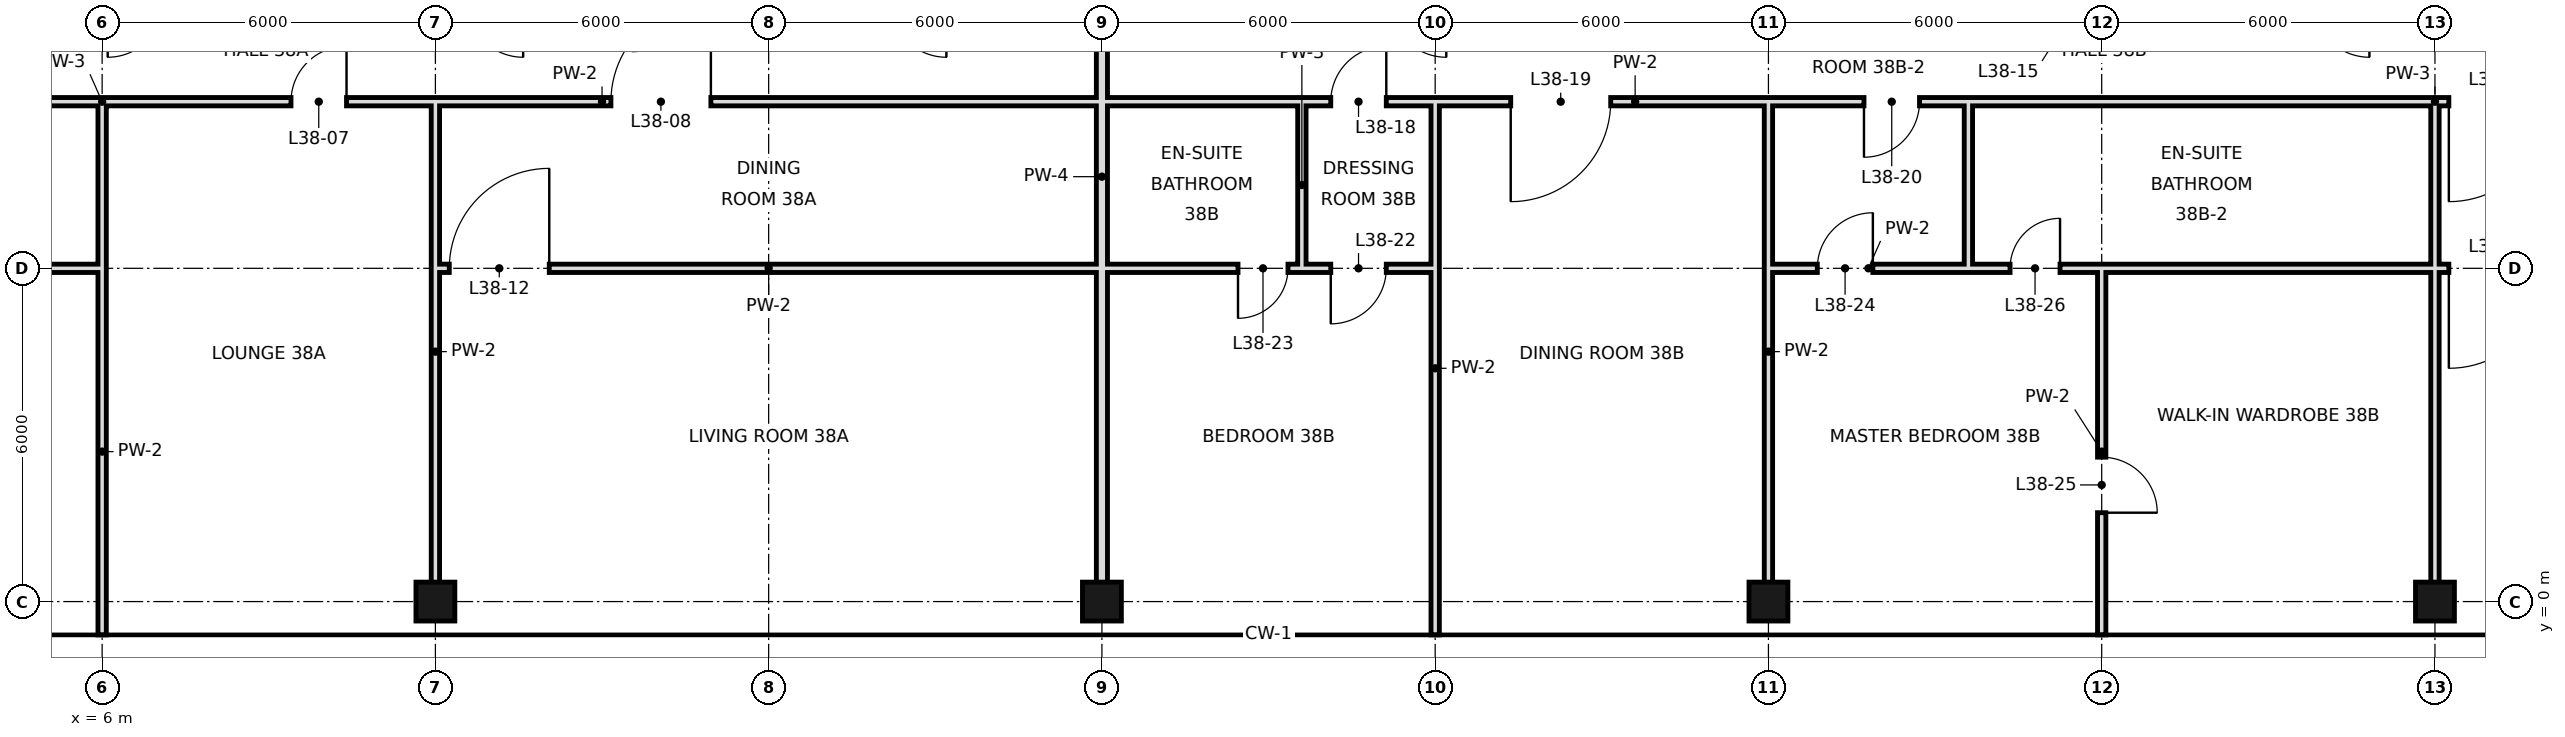
"""IFC4 building model, lengths in metres.
Left out: names, types, materials, properties, quantities, classifications, styles, units other than length and angle.
Written with IfcOpenShell. Run it as: python <this file> out.ifc"""

import sys

from ifc_helpers import new_model, si_unit, direction, frame, frame_2d, origin, origin_2d, place, context, subcontext, project, spatial, rectangle, hollow_rectangle, extrude, element, fill, save


model = new_model("IFC4")
c1 = context("Model", 3, precision=1e-05, world=origin(), true_north=direction((0.0, 1.0)))
c2 = subcontext(c1, "Body", "Model", "MODEL_VIEW")
j1 = project(units=[si_unit("LENGTHUNIT", "METRE"), si_unit("PLANEANGLEUNIT", "RADIAN")], contexts=[c1])
p1 = place(None, origin())
s1 = spatial("IfcSite", under=j1, at=p1, CompositionType="ELEMENT")
p2 = place(p1, origin())
s2 = spatial("IfcBuilding", under=s1, at=p2, CompositionType="ELEMENT")
p3 = place(p2, frame((0.0, 0.0, 167.2)))
s3 = spatial("IfcBuildingStorey", under=s2, at=p3, CompositionType="ELEMENT", Elevation=167.2)
for number, where, z_axis, x_axis in (
    (1, (12.0, 0.0, 0.0), (0.0, 0.0, 1.0), (1.0, 0.0, 0.0)),
    (2, (24.0, 0.0, 0.0), (0.0, 0.0, 1.0), (1.0, 0.0, 0.0)),
    (3, (36.0, 0.0, 0.0), (0.0, 0.0, 1.0), (1.0, 0.0, 0.0)),
    (4, (48.0, 0.0, 0.0), (0.0, 0.0, 1.0), (1.0, 0.0, 0.0)),
):
    element("IfcColumn", number, at=place(p3, frame(where, z_axis=z_axis, x_axis=x_axis)), inside=s3, PredefinedType="COLUMN", context=c2, shape_type="SweptSolid", body=[
        extrude(hollow_rectangle(XDim=0.7, YDim=0.7, WallThickness=0.036, at=origin_2d()), origin(), (0.0, 0.0, 1.0), 3.6),
    ])
p4 = place(p3, frame((12.0, 0.0, 0.0), z_axis=(0.0, 0.0, 1.0), x_axis=(0.0, 1.0, 0.0)))
e5 = element("IfcWall", 5, at=p4, inside=s3, PredefinedType="PARTITIONING", context=c2, shape_type="SweptSolid", body=[
    extrude(rectangle(XDim=9.0, YDim=0.15, at=frame_2d((4.5, 0.0))), origin(), (0.0, 0.0, 1.0), 2.72),
])
p5 = place(p3, frame((24.0, 0.0, 0.0), z_axis=(0.0, 0.0, 1.0), x_axis=(0.0, 1.0, 0.0)))
e6 = element("IfcWall", 6, at=p5, inside=s3, PredefinedType="SOLIDWALL", context=c2, shape_type="SweptSolid", body=[
    extrude(rectangle(XDim=15.3, YDim=0.2, at=frame_2d((7.65, 0.0))), origin(), (0.0, 0.0, 1.0), 2.72),
])
p6 = place(p3, frame((27.6, 6.0, 0.0), z_axis=(0.0, 0.0, 1.0), x_axis=(0.0, 1.0, 0.0)))
e7 = element("IfcWall", 7, at=p6, inside=s3, PredefinedType="PARTITIONING", context=c2, shape_type="SweptSolid", body=[
    extrude(rectangle(XDim=3.0, YDim=0.15, at=frame_2d((1.5, 0.0))), origin(), (0.0, 0.0, 1.0), 3.42),
])
p7 = place(p3, frame((30.0, -0.6, 0.0), z_axis=(0.0, 0.0, 1.0), x_axis=(0.0, 1.0, 0.0)))
e8 = element("IfcWall", 8, at=p7, inside=s3, PredefinedType="PARTITIONING", context=c2, shape_type="SweptSolid", body=[
    extrude(rectangle(XDim=9.6, YDim=0.15, at=frame_2d((4.8, 0.0))), origin(), (0.0, 0.0, 1.0), 2.72),
])
p8 = place(p3, frame((36.0, 0.0, 0.0), z_axis=(0.0, 0.0, 1.0), x_axis=(0.0, 1.0, 0.0)))
e9 = element("IfcWall", 9, at=p8, inside=s3, PredefinedType="PARTITIONING", context=c2, shape_type="SweptSolid", body=[
    extrude(rectangle(XDim=9.0, YDim=0.15, at=frame_2d((4.5, 0.0))), origin(), (0.0, 0.0, 1.0), 2.72),
])
p9 = place(p3, frame((39.6, 6.0, 0.0), z_axis=(0.0, 0.0, 1.0), x_axis=(0.0, 1.0, 0.0)))
e10 = element("IfcWall", 10, at=p9, inside=s3, PredefinedType="PARTITIONING", context=c2, shape_type="SweptSolid", body=[
    extrude(rectangle(XDim=3.0, YDim=0.15, at=frame_2d((1.5, 0.0))), origin(), (0.0, 0.0, 1.0), 3.42),
])
p10 = place(p3, frame((42.0, -0.6, 0.0), z_axis=(0.0, 0.0, 1.0), x_axis=(0.0, 1.0, 0.0)))
e11 = element("IfcWall", 11, at=p10, inside=s3, PredefinedType="PARTITIONING", context=c2, shape_type="SweptSolid", body=[
    extrude(rectangle(XDim=6.6, YDim=0.15, at=frame_2d((3.3, 0.0))), origin(), (0.0, 0.0, 1.0), 2.72),
])
p11 = place(p10, frame((2.2, 0.0, 0.0)))
e12 = element("IfcOpeningElement", 12, at=p11, cuts=e11, PredefinedType="OPENING", context=c2, shape_type="SweptSolid", body=[
    extrude(rectangle(XDim=1.0, YDim=2.4, at=frame_2d((0.5, 1.2))), frame((0.0, 0.085, 0.0), z_axis=(0.0, -1.0, 0.0), x_axis=(1.0, 0.0, 0.0)), (0.0, 0.0, 1.0), 0.17),
])
p12 = place(p3, frame((48.0, 0.0, 0.0), z_axis=(0.0, 0.0, 1.0), x_axis=(0.0, 1.0, 0.0)))
e13 = element("IfcWall", 13, at=p12, inside=s3, PredefinedType="PARTITIONING", context=c2, shape_type="SweptSolid", body=[
    extrude(rectangle(XDim=6.0, YDim=0.15, at=frame_2d((3.0, 0.0))), origin(), (0.0, 0.0, 1.0), 2.72),
])
p13 = place(p3, frame((48.0, 6.0, 0.0), z_axis=(0.0, 0.0, 1.0), x_axis=(0.0, 1.0, 0.0)))
e14 = element("IfcWall", 14, at=p13, inside=s3, PredefinedType="PARTITIONING", context=c2, shape_type="SweptSolid", body=[
    extrude(rectangle(XDim=3.0, YDim=0.15, at=frame_2d((1.5, 0.0))), origin(), (0.0, 0.0, 1.0), 2.72),
])
p14 = place(p3, frame((6.0, -0.6, 0.0), z_axis=(0.0, 0.0, 1.0), x_axis=(0.0, 1.0, 0.0)))
e15 = element("IfcWall", 15, at=p14, inside=s3, PredefinedType="PARTITIONING", context=c2, shape_type="SweptSolid", body=[
    extrude(rectangle(XDim=6.6, YDim=0.15, at=frame_2d((3.3, 0.0))), origin(), (0.0, 0.0, 1.0), 2.72),
])
p15 = place(p3, frame((6.0, 6.0, 0.0), z_axis=(0.0, 0.0, 1.0), x_axis=(0.0, 1.0, 0.0)))
e16 = element("IfcWall", 16, at=p15, inside=s3, PredefinedType="PARTITIONING", context=c2, shape_type="SweptSolid", body=[
    extrude(rectangle(XDim=3.0, YDim=0.15, at=frame_2d((1.5, 0.0))), origin(), (0.0, 0.0, 1.0), 2.72),
])
p16 = place(p3, frame((12.0, 6.0, 0.0), z_axis=(0.0, 0.0, 1.0), x_axis=(1.0, 0.0, 0.0)))
e17 = element("IfcWall", 17, at=p16, inside=s3, PredefinedType="PARTITIONING", context=c2, shape_type="SweptSolid", body=[
    extrude(rectangle(XDim=12.0, YDim=0.15, at=frame_2d((6.0, 0.0))), origin(), (0.0, 0.0, 1.0), 2.97),
])
p17 = place(p16, frame((0.25, 0.0, 0.0)))
e18 = element("IfcOpeningElement", 18, at=p17, cuts=e17, PredefinedType="OPENING", context=c2, shape_type="SweptSolid", body=[
    extrude(rectangle(XDim=1.8, YDim=2.4, at=frame_2d((0.9, 1.2))), frame((0.0, 0.085, 0.0), z_axis=(0.0, -1.0, 0.0), x_axis=(1.0, 0.0, 0.0)), (0.0, 0.0, 1.0), 0.17),
])
p18 = place(p3, frame((27.6, 6.0, 0.0), z_axis=(0.0, 0.0, 1.0), x_axis=(1.0, 0.0, 0.0)))
e19 = element("IfcWall", 19, at=p18, inside=s3, PredefinedType="PARTITIONING", context=c2, shape_type="SweptSolid", body=[
    extrude(rectangle(XDim=2.4, YDim=0.15, at=frame_2d((1.2, 0.0))), origin(), (0.0, 0.0, 1.0), 2.97),
])
p19 = place(p18, frame((0.52, 0.0, 0.0)))
e20 = element("IfcOpeningElement", 20, at=p19, cuts=e19, PredefinedType="OPENING", context=c2, shape_type="SweptSolid", body=[
    extrude(rectangle(XDim=1.0, YDim=2.4, at=frame_2d((0.5, 1.2))), frame((0.0, 0.085, 0.0), z_axis=(0.0, -1.0, 0.0), x_axis=(1.0, 0.0, 0.0)), (0.0, 0.0, 1.0), 0.17),
])
p20 = place(p3, frame((36.0, 6.0, 0.0), z_axis=(0.0, 0.0, 1.0), x_axis=(1.0, 0.0, 0.0)))
e21 = element("IfcWall", 21, at=p20, inside=s3, PredefinedType="PARTITIONING", context=c2, shape_type="SweptSolid", body=[
    extrude(rectangle(XDim=3.6, YDim=0.15, at=frame_2d((1.8, 0.0))), origin(), (0.0, 0.0, 1.0), 2.97),
])
p21 = place(p20, frame((0.88, 0.0, 0.0)))
e22 = element("IfcOpeningElement", 22, at=p21, cuts=e21, PredefinedType="OPENING", context=c2, shape_type="SweptSolid", body=[
    extrude(rectangle(XDim=1.0, YDim=2.4, at=frame_2d((0.5, 1.2))), frame((0.0, 0.085, 0.0), z_axis=(0.0, -1.0, 0.0), x_axis=(1.0, 0.0, 0.0)), (0.0, 0.0, 1.0), 0.17),
])
p22 = place(p3, frame((48.0, 6.0, 0.0), z_axis=(0.0, 0.0, 1.0), x_axis=(1.0, 0.0, 0.0)))
e23 = element("IfcWall", 23, at=p22, inside=s3, PredefinedType="PARTITIONING", context=c2, shape_type="SweptSolid", body=[
    extrude(rectangle(XDim=12.0, YDim=0.15, at=frame_2d((6.0, 0.0))), origin(), (0.0, 0.0, 1.0), 2.72),
])
p23 = place(p22, frame((0.25, 0.0, 0.0)))
e24 = element("IfcOpeningElement", 24, at=p23, cuts=e23, PredefinedType="OPENING", context=c2, shape_type="SweptSolid", body=[
    extrude(rectangle(XDim=1.8, YDim=2.4, at=frame_2d((0.9, 1.2))), frame((0.0, 0.085, 0.0), z_axis=(0.0, -1.0, 0.0), x_axis=(1.0, 0.0, 0.0)), (0.0, 0.0, 1.0), 0.17),
])
p24 = place(p3, frame((-2.4, 6.0, 0.0), z_axis=(0.0, 0.0, 1.0), x_axis=(1.0, 0.0, 0.0)))
e25 = element("IfcWall", 25, at=p24, inside=s3, PredefinedType="PARTITIONING", context=c2, shape_type="SweptSolid", body=[
    extrude(rectangle(XDim=8.4, YDim=0.15, at=frame_2d((4.2, 0.0))), origin(), (0.0, 0.0, 1.0), 2.97),
])
p25 = place(p24, frame((0.75, 0.0, 0.0)))
e26 = element("IfcOpeningElement", 26, at=p25, cuts=e25, PredefinedType="OPENING", context=c2, shape_type="SweptSolid", body=[
    extrude(rectangle(XDim=0.9, YDim=2.4, at=frame_2d((0.45, 1.2))), frame((0.0, 0.085, 0.0), z_axis=(0.0, -1.0, 0.0), x_axis=(1.0, 0.0, 0.0)), (0.0, 0.0, 1.0), 0.17),
])
p26 = place(p3, frame((24.0, 6.0, 0.0), z_axis=(0.0, 0.0, 1.0), x_axis=(1.0, 0.0, 0.0)))
e27 = element("IfcWall", 27, at=p26, inside=s3, PredefinedType="PARTITIONING", context=c2, shape_type="SweptSolid", body=[
    extrude(rectangle(XDim=3.6, YDim=0.15, at=frame_2d((1.8, 0.0))), origin(), (0.0, 0.0, 1.0), 2.97),
])
p27 = place(p26, frame((2.45, 0.0, 0.0)))
e28 = element("IfcOpeningElement", 28, at=p27, cuts=e27, PredefinedType="OPENING", context=c2, shape_type="SweptSolid", body=[
    extrude(rectangle(XDim=0.9, YDim=2.4, at=frame_2d((0.45, 1.2))), frame((0.0, 0.085, 0.0), z_axis=(0.0, -1.0, 0.0), x_axis=(1.0, 0.0, 0.0)), (0.0, 0.0, 1.0), 0.17),
])
p28 = place(p3, frame((39.6, 6.0, 0.0), z_axis=(0.0, 0.0, 1.0), x_axis=(1.0, 0.0, 0.0)))
e29 = element("IfcWall", 29, at=p28, inside=s3, PredefinedType="PARTITIONING", context=c2, shape_type="SweptSolid", body=[
    extrude(rectangle(XDim=8.4, YDim=0.15, at=frame_2d((4.2, 0.0))), origin(), (0.0, 0.0, 1.0), 2.97),
])
p29 = place(p28, frame((0.75, 0.0, 0.0)))
e30 = element("IfcOpeningElement", 30, at=p29, cuts=e29, PredefinedType="OPENING", context=c2, shape_type="SweptSolid", body=[
    extrude(rectangle(XDim=0.9, YDim=2.4, at=frame_2d((0.45, 1.2))), frame((0.0, 0.085, 0.0), z_axis=(0.0, -1.0, 0.0), x_axis=(1.0, 0.0, 0.0)), (0.0, 0.0, 1.0), 0.17),
])
p30 = place(p3, frame((6.0, 9.0, 0.0), z_axis=(0.0, 0.0, 1.0), x_axis=(1.0, 0.0, 0.0)))
e31 = element("IfcWall", 31, at=p30, inside=s3, PredefinedType="PARTITIONING", context=c2, shape_type="SweptSolid", body=[
    extrude(rectangle(XDim=18.0, YDim=0.15, at=frame_2d((9.0, 0.0))), origin(), (0.0, 0.0, 1.0), 3.42),
])
p31 = place(p30, frame((3.4, 0.0, 0.0)))
e32 = element("IfcOpeningElement", 32, at=p31, cuts=e31, PredefinedType="OPENING", context=c2, shape_type="SweptSolid", body=[
    extrude(rectangle(XDim=1.0, YDim=2.4, at=frame_2d((0.5, 1.2))), frame((0.0, 0.085, 0.0), z_axis=(0.0, -1.0, 0.0), x_axis=(1.0, 0.0, 0.0)), (0.0, 0.0, 1.0), 0.17),
])
p32 = place(p30, frame((9.16, 0.0, 0.0)))
e33 = element("IfcOpeningElement", 33, at=p32, cuts=e31, PredefinedType="OPENING", context=c2, shape_type="SweptSolid", body=[
    extrude(rectangle(XDim=1.8, YDim=2.4, at=frame_2d((0.9, 1.2))), frame((0.0, 0.085, 0.0), z_axis=(0.0, -1.0, 0.0), x_axis=(1.0, 0.0, 0.0)), (0.0, 0.0, 1.0), 0.17),
])
p33 = place(p3, frame((27.6, 9.0, 0.0), z_axis=(0.0, 0.0, 1.0), x_axis=(1.0, 0.0, 0.0)))
e34 = element("IfcWall", 34, at=p33, inside=s3, PredefinedType="PARTITIONING", context=c2, shape_type="SweptSolid", body=[
    extrude(rectangle(XDim=12.0, YDim=0.15, at=frame_2d((6.0, 0.0))), origin(), (0.0, 0.0, 1.0), 3.42),
])
p34 = place(p33, frame((0.52, 0.0, 0.0)))
e35 = element("IfcOpeningElement", 35, at=p34, cuts=e34, PredefinedType="OPENING", context=c2, shape_type="SweptSolid", body=[
    extrude(rectangle(XDim=1.0, YDim=2.4, at=frame_2d((0.5, 1.2))), frame((0.0, 0.085, 0.0), z_axis=(0.0, -1.0, 0.0), x_axis=(1.0, 0.0, 0.0)), (0.0, 0.0, 1.0), 0.17),
])
p35 = place(p33, frame((3.76, 0.0, 0.0)))
e36 = element("IfcOpeningElement", 36, at=p35, cuts=e34, PredefinedType="OPENING", context=c2, shape_type="SweptSolid", body=[
    extrude(rectangle(XDim=1.8, YDim=2.4, at=frame_2d((0.9, 1.2))), frame((0.0, 0.085, 0.0), z_axis=(0.0, -1.0, 0.0), x_axis=(1.0, 0.0, 0.0)), (0.0, 0.0, 1.0), 0.17),
])
p36 = place(p33, frame((10.12, 0.0, 0.0)))
e37 = element("IfcOpeningElement", 37, at=p36, cuts=e34, PredefinedType="OPENING", context=c2, shape_type="SweptSolid", body=[
    extrude(rectangle(XDim=1.0, YDim=2.4, at=frame_2d((0.5, 1.2))), frame((0.0, 0.085, 0.0), z_axis=(0.0, -1.0, 0.0), x_axis=(1.0, 0.0, 0.0)), (0.0, 0.0, 1.0), 0.17),
])
p37 = place(p3, frame((48.0, 9.0, 0.0), z_axis=(0.0, 0.0, 1.0), x_axis=(1.0, 0.0, 0.0)))
e38 = element("IfcWall", 38, at=p37, inside=s3, PredefinedType="PARTITIONING", context=c2, shape_type="SweptSolid", body=[
    extrude(rectangle(XDim=12.6, YDim=0.15, at=frame_2d((6.3, 0.0))), origin(), (0.0, 0.0, 1.0), 3.42),
])
p38 = place(p37, frame((0.25, 0.0, 0.0)))
e39 = element("IfcOpeningElement", 39, at=p38, cuts=e38, PredefinedType="OPENING", context=c2, shape_type="SweptSolid", body=[
    extrude(rectangle(XDim=1.8, YDim=2.4, at=frame_2d((0.9, 1.2))), frame((0.0, 0.085, 0.0), z_axis=(0.0, -1.0, 0.0), x_axis=(1.0, 0.0, 0.0)), (0.0, 0.0, 1.0), 0.17),
])
p39 = place(p3, frame((-2.4, 9.0, 0.0), z_axis=(0.0, 0.0, 1.0), x_axis=(1.0, 0.0, 0.0)))
e40 = element("IfcWall", 40, at=p39, inside=s3, PredefinedType="PARTITIONING", context=c2, shape_type="SweptSolid", body=[
    extrude(rectangle(XDim=8.4, YDim=0.15, at=frame_2d((4.2, 0.0))), origin(), (0.0, 0.0, 1.0), 3.42),
])
p40 = place(p3, frame((24.0, 9.0, 0.0), z_axis=(0.0, 0.0, 1.0), x_axis=(1.0, 0.0, 0.0)))
e41 = element("IfcWall", 41, at=p40, inside=s3, PredefinedType="PARTITIONING", context=c2, shape_type="SweptSolid", body=[
    extrude(rectangle(XDim=3.6, YDim=0.15, at=frame_2d((1.8, 0.0))), origin(), (0.0, 0.0, 1.0), 3.42),
])
p41 = place(p3, frame((39.6, 9.0, 0.0), z_axis=(0.0, 0.0, 1.0), x_axis=(1.0, 0.0, 0.0)))
e42 = element("IfcWall", 42, at=p41, inside=s3, PredefinedType="PARTITIONING", context=c2, shape_type="SweptSolid", body=[
    extrude(rectangle(XDim=8.4, YDim=0.15, at=frame_2d((4.2, 0.0))), origin(), (0.0, 0.0, 1.0), 3.42),
])
p42 = place(p31, frame((1.0, 0.0, 0.0), z_axis=(0.0, 0.0, 1.0), x_axis=(-1.0, 0.0, 0.0)))
e43 = element("IfcDoor", 43, at=p42, inside=s3, OperationType="SINGLE_SWING_LEFT", PredefinedType="DOOR", context=c2, shape_type="SweptSolid", body=[
    extrude(rectangle(XDim=1.0, YDim=2.4, at=frame_2d((0.5, 1.2))), frame((0.0, 0.025, 0.0), z_axis=(0.0, -1.0, 0.0), x_axis=(1.0, 0.0, 0.0)), (0.0, 0.0, 1.0), 0.05),
])
fill(e32, e43)
p43 = place(p32, frame((1.8, 0.0, 0.0), z_axis=(0.0, 0.0, 1.0), x_axis=(-1.0, 0.0, 0.0)))
e44 = element("IfcDoor", 44, at=p43, inside=s3, OperationType="SINGLE_SWING_LEFT", PredefinedType="DOOR", context=c2, shape_type="SweptSolid", body=[
    extrude(rectangle(XDim=1.8, YDim=2.4, at=frame_2d((0.9, 1.2))), frame((0.0, 0.025, 0.0), z_axis=(0.0, -1.0, 0.0), x_axis=(1.0, 0.0, 0.0)), (0.0, 0.0, 1.0), 0.05),
])
fill(e33, e44)
p44 = place(p17, frame((1.8, 0.0, 0.0), z_axis=(0.0, 0.0, 1.0), x_axis=(-1.0, 0.0, 0.0)))
e45 = element("IfcDoor", 45, at=p44, inside=s3, OperationType="SINGLE_SWING_LEFT", PredefinedType="DOOR", context=c2, shape_type="SweptSolid", body=[
    extrude(rectangle(XDim=1.8, YDim=2.4, at=frame_2d((0.9, 1.2))), frame((0.0, 0.025, 0.0), z_axis=(0.0, -1.0, 0.0), x_axis=(1.0, 0.0, 0.0)), (0.0, 0.0, 1.0), 0.05),
])
fill(e18, e45)
p45 = place(p34, frame((1.0, 0.0, 0.0), z_axis=(0.0, 0.0, 1.0), x_axis=(-1.0, 0.0, 0.0)))
e46 = element("IfcDoor", 46, at=p45, inside=s3, OperationType="SINGLE_SWING_LEFT", PredefinedType="DOOR", context=c2, shape_type="SweptSolid", body=[
    extrude(rectangle(XDim=1.0, YDim=2.4, at=frame_2d((0.5, 1.2))), frame((0.0, 0.025, 0.0), z_axis=(0.0, -1.0, 0.0), x_axis=(1.0, 0.0, 0.0)), (0.0, 0.0, 1.0), 0.05),
])
fill(e35, e46)
p46 = place(p35, frame((1.8, 0.0, 0.0), z_axis=(0.0, 0.0, 1.0), x_axis=(-1.0, 0.0, 0.0)))
e47 = element("IfcDoor", 47, at=p46, inside=s3, OperationType="SINGLE_SWING_RIGHT", PredefinedType="DOOR", context=c2, shape_type="SweptSolid", body=[
    extrude(rectangle(XDim=1.8, YDim=2.4, at=frame_2d((0.9, 1.2))), frame((0.0, 0.025, 0.0), z_axis=(0.0, -1.0, 0.0), x_axis=(1.0, 0.0, 0.0)), (0.0, 0.0, 1.0), 0.05),
])
fill(e36, e47)
p47 = place(p36, frame((1.0, 0.0, 0.0), z_axis=(0.0, 0.0, 1.0), x_axis=(-1.0, 0.0, 0.0)))
e48 = element("IfcDoor", 48, at=p47, inside=s3, OperationType="SINGLE_SWING_RIGHT", PredefinedType="DOOR", context=c2, shape_type="SweptSolid", body=[
    extrude(rectangle(XDim=1.0, YDim=2.4, at=frame_2d((0.5, 1.2))), frame((0.0, 0.025, 0.0), z_axis=(0.0, -1.0, 0.0), x_axis=(1.0, 0.0, 0.0)), (0.0, 0.0, 1.0), 0.05),
])
fill(e37, e48)
p48 = place(p38, frame((1.8, 0.0, 0.0), z_axis=(0.0, 0.0, 1.0), x_axis=(-1.0, 0.0, 0.0)))
e49 = element("IfcDoor", 49, at=p48, inside=s3, OperationType="SINGLE_SWING_RIGHT", PredefinedType="DOOR", context=c2, shape_type="SweptSolid", body=[
    extrude(rectangle(XDim=1.8, YDim=2.4, at=frame_2d((0.9, 1.2))), frame((0.0, 0.025, 0.0), z_axis=(0.0, -1.0, 0.0), x_axis=(1.0, 0.0, 0.0)), (0.0, 0.0, 1.0), 0.05),
])
fill(e39, e49)
p49 = place(p19, frame((1.0, 0.0, 0.0), z_axis=(0.0, 0.0, 1.0), x_axis=(-1.0, 0.0, 0.0)))
e50 = element("IfcDoor", 50, at=p49, inside=s3, OperationType="SINGLE_SWING_RIGHT", PredefinedType="DOOR", context=c2, shape_type="SweptSolid", body=[
    extrude(rectangle(XDim=1.0, YDim=2.4, at=frame_2d((0.5, 1.2))), frame((0.0, 0.025, 0.0), z_axis=(0.0, -1.0, 0.0), x_axis=(1.0, 0.0, 0.0)), (0.0, 0.0, 1.0), 0.05),
])
fill(e20, e50)
p50 = place(p27, frame((0.9, 0.0, 0.0), z_axis=(0.0, 0.0, 1.0), x_axis=(-1.0, 0.0, 0.0)))
e51 = element("IfcDoor", 51, at=p50, inside=s3, OperationType="SINGLE_SWING_RIGHT", PredefinedType="DOOR", context=c2, shape_type="SweptSolid", body=[
    extrude(rectangle(XDim=0.9, YDim=2.4, at=frame_2d((0.45, 1.2))), frame((0.0, 0.025, 0.0), z_axis=(0.0, -1.0, 0.0), x_axis=(1.0, 0.0, 0.0)), (0.0, 0.0, 1.0), 0.05),
])
fill(e28, e51)
p51 = place(p21, frame((1.0, 0.0, 0.0), z_axis=(0.0, 0.0, 1.0), x_axis=(-1.0, 0.0, 0.0)))
e52 = element("IfcDoor", 52, at=p51, inside=s3, OperationType="SINGLE_SWING_LEFT", PredefinedType="DOOR", context=c2, shape_type="SweptSolid", body=[
    extrude(rectangle(XDim=1.0, YDim=2.4, at=frame_2d((0.5, 1.2))), frame((0.0, 0.025, 0.0), z_axis=(0.0, -1.0, 0.0), x_axis=(1.0, 0.0, 0.0)), (0.0, 0.0, 1.0), 0.05),
])
fill(e22, e52)
p52 = place(p11, frame((1.0, 0.0, 0.0), z_axis=(0.0, 0.0, 1.0), x_axis=(-1.0, 0.0, 0.0)))
e53 = element("IfcDoor", 53, at=p52, inside=s3, OperationType="SINGLE_SWING_RIGHT", PredefinedType="DOOR", context=c2, shape_type="SweptSolid", body=[
    extrude(rectangle(XDim=1.0, YDim=2.4, at=frame_2d((0.5, 1.2))), frame((0.0, 0.025, 0.0), z_axis=(0.0, -1.0, 0.0), x_axis=(1.0, 0.0, 0.0)), (0.0, 0.0, 1.0), 0.05),
])
fill(e12, e53)
p53 = place(p29, frame((0.9, 0.0, 0.0), z_axis=(0.0, 0.0, 1.0), x_axis=(-1.0, 0.0, 0.0)))
e54 = element("IfcDoor", 54, at=p53, inside=s3, OperationType="SINGLE_SWING_LEFT", PredefinedType="DOOR", context=c2, shape_type="SweptSolid", body=[
    extrude(rectangle(XDim=0.9, YDim=2.4, at=frame_2d((0.45, 1.2))), frame((0.0, 0.025, 0.0), z_axis=(0.0, -1.0, 0.0), x_axis=(1.0, 0.0, 0.0)), (0.0, 0.0, 1.0), 0.05),
])
fill(e30, e54)
p54 = place(p23, frame((1.8, 0.0, 0.0), z_axis=(0.0, 0.0, 1.0), x_axis=(-1.0, 0.0, 0.0)))
e55 = element("IfcDoor", 55, at=p54, inside=s3, OperationType="SINGLE_SWING_RIGHT", PredefinedType="DOOR", context=c2, shape_type="SweptSolid", body=[
    extrude(rectangle(XDim=1.8, YDim=2.4, at=frame_2d((0.9, 1.2))), frame((0.0, 0.025, 0.0), z_axis=(0.0, -1.0, 0.0), x_axis=(1.0, 0.0, 0.0)), (0.0, 0.0, 1.0), 0.05),
])
fill(e24, e55)
save(model, sys.argv[1])
